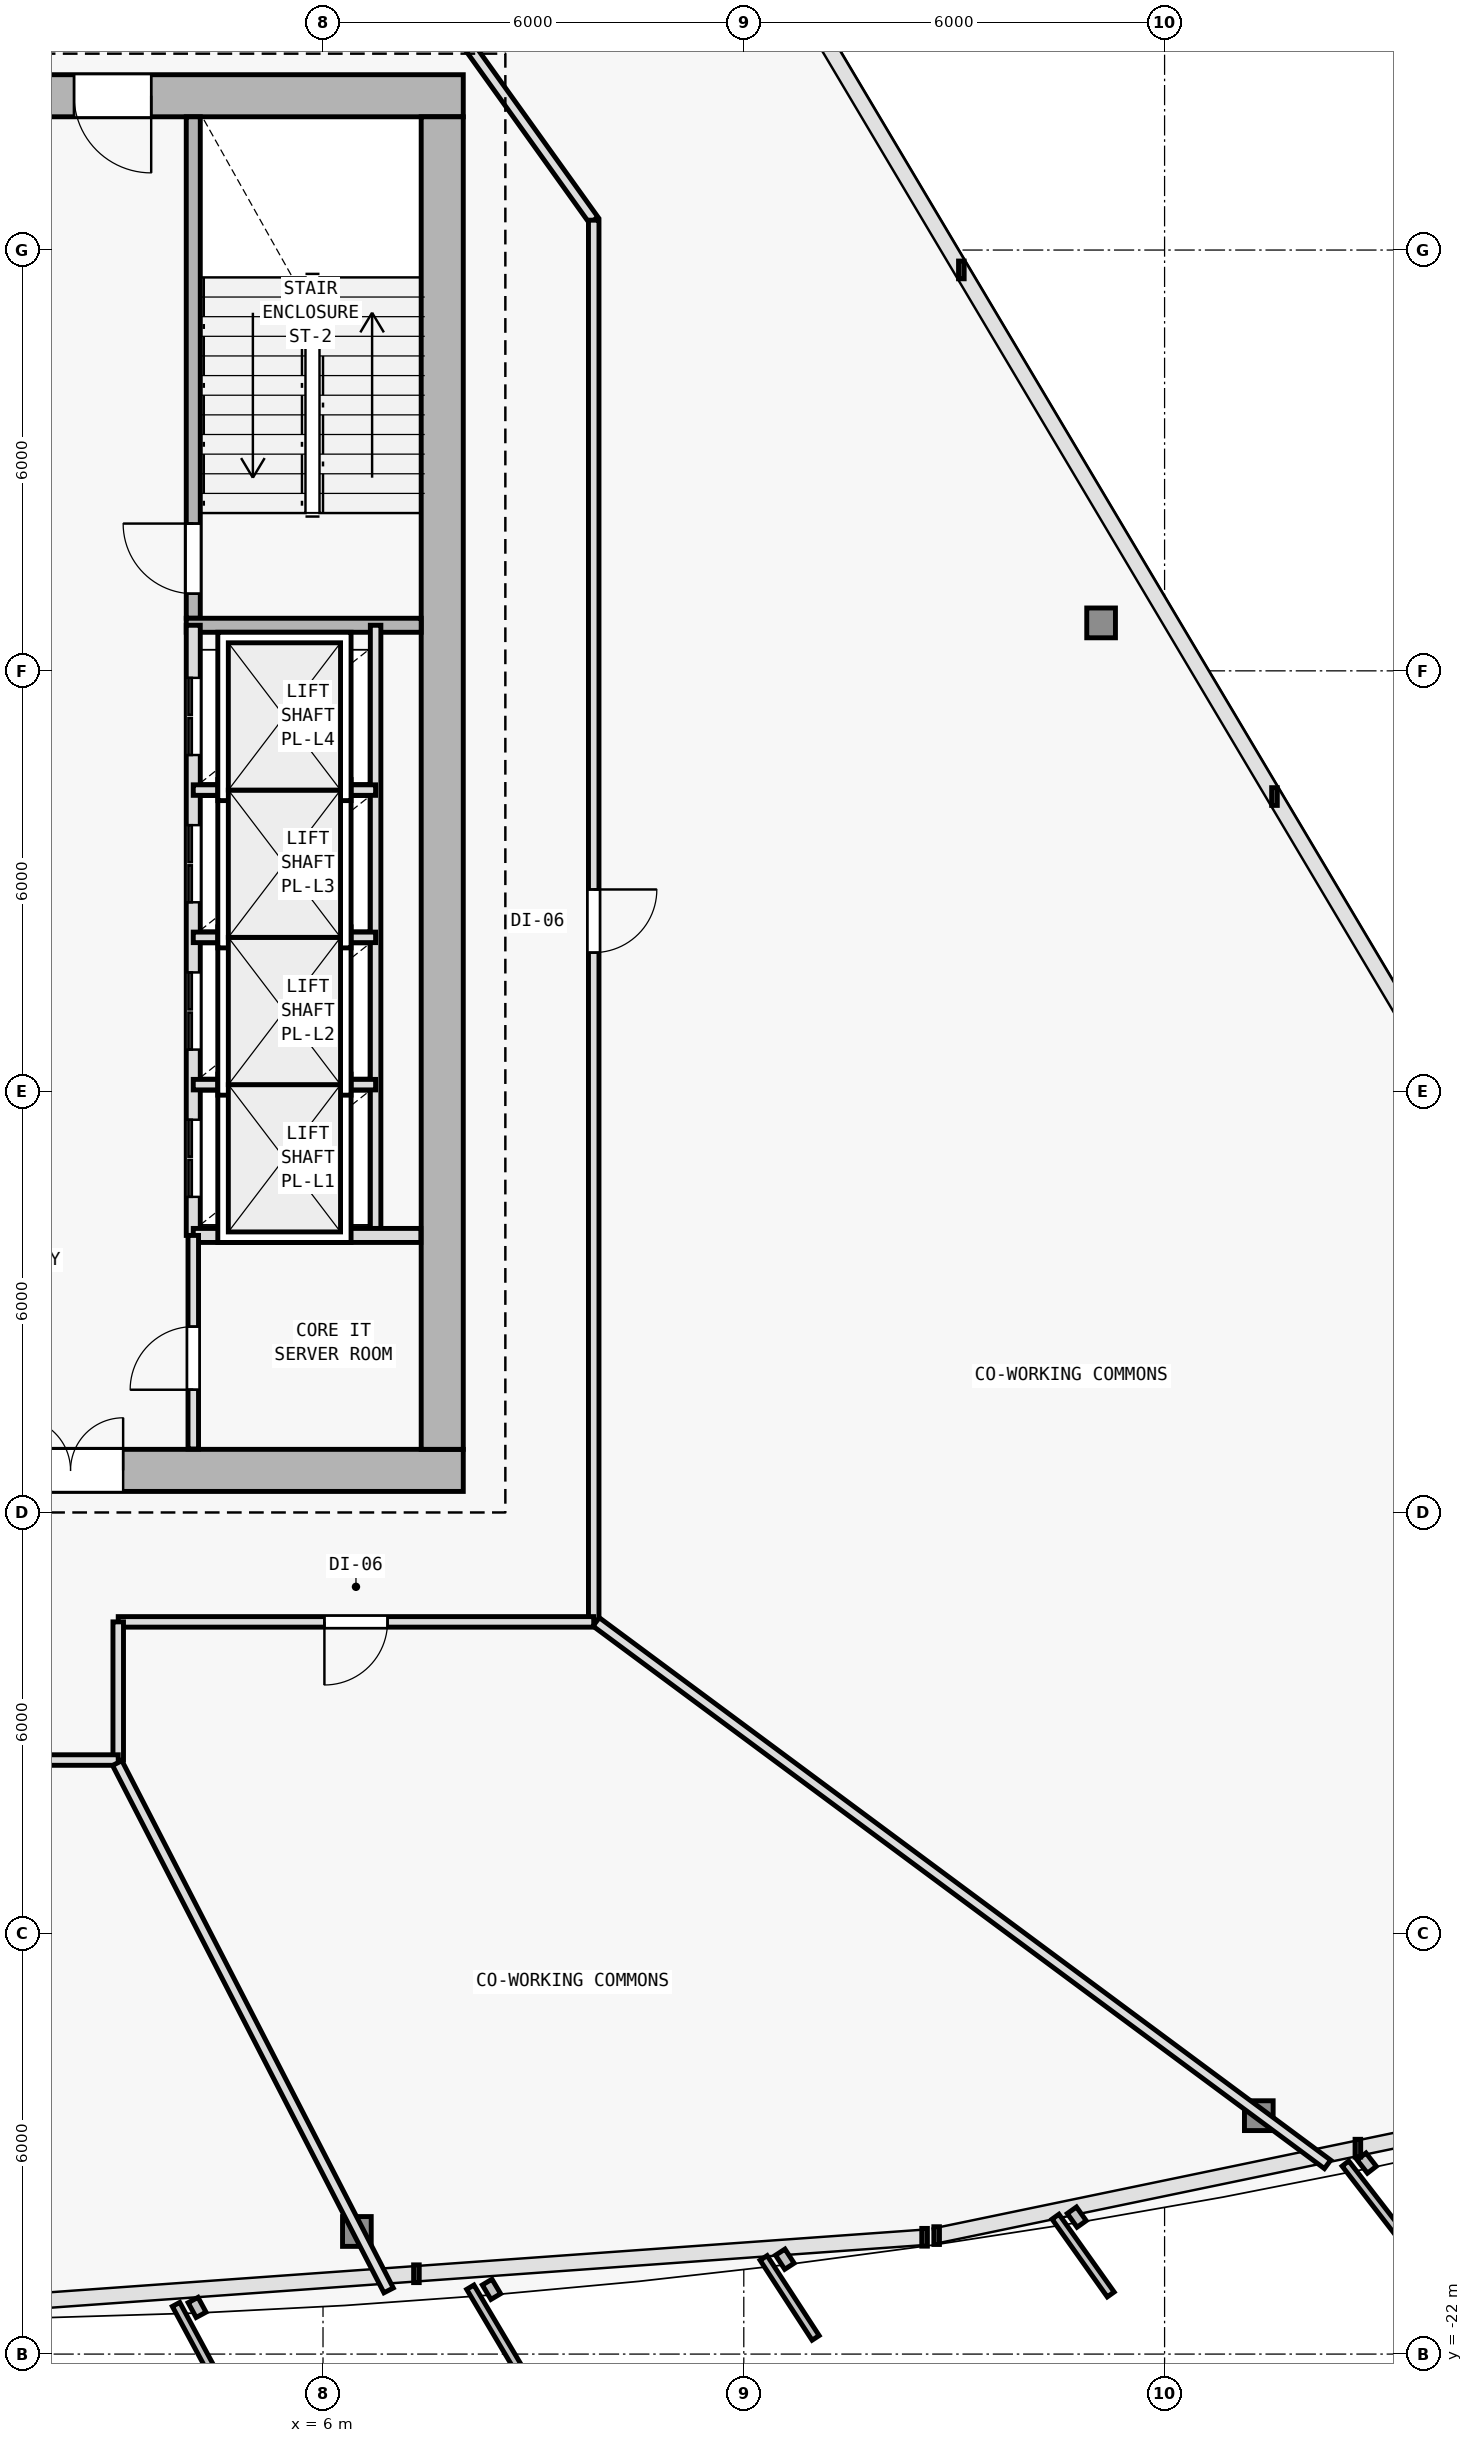
"""IFC4 building model, lengths in metres.
Left out: names, types, materials, properties, quantities, classifications, styles, units other than length and angle.
Written with IfcOpenShell. Run it as: python <this file> out.ifc"""

import sys

from ifc_helpers import new_model, si_unit, direction, frame, frame_2d, origin, origin_2d, place, context, subcontext, project, spatial, rectangle, i_section, extrude, element, fill, save


model = new_model("IFC4")
c1 = context("Model", 3, precision=1e-05, world=origin(), true_north=direction((0.0, 1.0)))
c2 = subcontext(c1, "Body", "Model", "MODEL_VIEW")
j1 = project(units=[si_unit("LENGTHUNIT", "METRE"), si_unit("PLANEANGLEUNIT", "RADIAN")], contexts=[c1])
p1 = place(None, origin())
s1 = spatial("IfcSite", under=j1, at=p1, CompositionType="ELEMENT")
p2 = place(p1, origin())
s2 = spatial("IfcBuilding", under=s1, at=p2, CompositionType="ELEMENT")
p3 = place(p2, frame((0.0, 0.0, 78.0)))
s3 = spatial("IfcBuildingStorey", under=s2, at=p3, CompositionType="ELEMENT", Elevation=78.0)
for number, where, z_axis, x_axis in (
    (1, (7.7, -9.4, 0.0), (0.0, 0.0, 1.0), (1.0, 0.0, 0.0)),
    (2, (7.7, 10.2, 0.0), (0.0, 0.0, 1.0), (1.0, 0.0, 0.0)),
    (3, (7.7, 0.4, 0.0), (0.0, 0.0, 1.0), (1.0, 0.0, 0.0)),
):
    element("IfcColumn", number, at=place(p3, frame(where, z_axis=z_axis, x_axis=x_axis)), inside=s3, PredefinedType="COLUMN", context=c2, shape_type="SweptSolid", body=[
        extrude(i_section(OverallWidth=0.416, OverallDepth=0.446, WebThickness=0.025, FlangeThickness=0.04, FilletRadius=0.015, at=origin_2d()), origin(), (0.0, 0.0, 1.0), 4.5),
    ])
p4 = place(p3, frame((6.483, -20.252, 0.006), z_axis=(-0.005491040061, 0.028216334572, 0.999586758087), x_axis=(-0.981585848295, -0.191021523464, 0.0)))
e4 = element("IfcColumn", 4, at=p4, inside=s3, PredefinedType="COLUMN", context=c2, shape_type="SweptSolid", body=[
    extrude(i_section(OverallWidth=0.409, OverallDepth=0.425, WebThickness=0.021, FlangeThickness=0.034, FilletRadius=0.015, at=origin_2d()), origin(), (0.0, 0.0, 1.0), 4.491),
])
p5 = place(p3, frame((19.344, -18.601, 0.006), z_axis=(-0.016526121628, 0.026800585403, 0.999504185047), x_axis=(-0.851183725565, -0.524867855115, 0.0)))
e5 = element("IfcColumn", 5, at=p5, inside=s3, PredefinedType="COLUMN", context=c2, shape_type="SweptSolid", body=[
    extrude(i_section(OverallWidth=0.409, OverallDepth=0.425, WebThickness=0.021, FlangeThickness=0.034, FilletRadius=0.015, at=origin_2d()), origin(), (0.0, 0.0, 1.0), 4.491),
])
p6 = place(p3, frame((17.095, 2.684, 0.006), z_axis=(-0.015118033886, 0.00761339836, 0.999856730345), x_axis=(-0.449781931574, -0.893138406984, 0.0)))
e6 = element("IfcColumn", 6, at=p6, inside=s3, PredefinedType="COLUMN", context=c2, shape_type="SweptSolid", body=[
    extrude(i_section(OverallWidth=0.409, OverallDepth=0.425, WebThickness=0.021, FlangeThickness=0.034, FilletRadius=0.015, at=origin_2d()), origin(), (0.0, 0.0, 1.0), 4.49),
])
p7 = place(p3, frame((-8.0, -9.4, 0.0), z_axis=(0.0, 0.0, 1.0), x_axis=(1.0, 0.0, 0.0)))
e7 = element("IfcWall", 7, at=p7, inside=s3, PredefinedType="SHEAR", context=c2, shape_type="SweptSolid", body=[
    extrude(rectangle(XDim=16.0, YDim=0.6, at=frame_2d((8.0, 0.0))), origin(), (0.0, 0.0, 1.0), 4.25),
])
p8 = place(p7, frame((9.65, 0.0, 0.0)))
e8 = element("IfcOpeningElement", 8, at=p8, cuts=e7, PredefinedType="OPENING", context=c2, shape_type="SweptSolid", body=[
    extrude(rectangle(XDim=1.5, YDim=2.2, at=frame_2d((0.75, 1.1))), frame((0.0, 0.31, 0.0), z_axis=(0.0, -1.0, 0.0), x_axis=(1.0, 0.0, 0.0)), (0.0, 0.0, 1.0), 0.62),
])
p9 = place(p3, frame((8.0, 10.2, 0.0), z_axis=(0.0, 0.0, 1.0), x_axis=(-1.0, 0.0, 0.0)))
e9 = element("IfcWall", 9, at=p9, inside=s3, PredefinedType="SHEAR", context=c2, shape_type="SweptSolid", body=[
    extrude(rectangle(XDim=16.0, YDim=0.6, at=frame_2d((8.0, 0.0))), origin(), (0.0, 0.0, 1.0), 4.25),
])
p10 = place(p9, frame((4.45, 0.0, 0.0)))
e10 = element("IfcOpeningElement", 10, at=p10, cuts=e9, PredefinedType="OPENING", context=c2, shape_type="SweptSolid", body=[
    extrude(rectangle(XDim=1.1, YDim=2.15, at=frame_2d((0.55, 1.075))), frame((0.0, 0.31, 0.0), z_axis=(0.0, -1.0, 0.0), x_axis=(1.0, 0.0, 0.0)), (0.0, 0.0, 1.0), 0.62),
])
p11 = place(p3, frame((7.7, 9.9, 0.0), z_axis=(0.0, 0.0, 1.0), x_axis=(0.0, -1.0, 0.0)))
e11 = element("IfcWall", 11, at=p11, inside=s3, PredefinedType="SHEAR", context=c2, shape_type="SweptSolid", body=[
    extrude(rectangle(XDim=19.0, YDim=0.6, at=frame_2d((9.5, 0.0))), origin(), (0.0, 0.0, 1.0), 4.25),
])
p12 = place(p3, frame((4.15, 2.75, 0.0), z_axis=(0.0, 0.0, 1.0), x_axis=(0.0, 1.0, 0.0)))
e12 = element("IfcWall", 12, at=p12, inside=s3, PredefinedType="SOLIDWALL", context=c2, shape_type="SweptSolid", body=[
    extrude(rectangle(XDim=7.15, YDim=0.2, at=frame_2d((3.575, 0.0))), origin(), (0.0, 0.0, 1.0), 4.25),
])
p13 = place(p12, frame((0.35, 0.0, 0.0)))
e13 = element("IfcOpeningElement", 13, at=p13, cuts=e12, PredefinedType="OPENING", context=c2, shape_type="SweptSolid", body=[
    extrude(rectangle(XDim=1.0, YDim=2.15, at=frame_2d((0.5, 1.075))), frame((0.0, 0.11, 0.0), z_axis=(0.0, -1.0, 0.0), x_axis=(1.0, 0.0, 0.0)), (0.0, 0.0, 1.0), 0.22),
])
p14 = place(p3, frame((4.05, 2.65, 0.0), z_axis=(0.0, 0.0, 1.0), x_axis=(1.0, 0.0, 0.0)))
e14 = element("IfcWall", 14, at=p14, inside=s3, PredefinedType="SOLIDWALL", context=c2, shape_type="SweptSolid", body=[
    extrude(rectangle(XDim=3.35, YDim=0.2, at=frame_2d((1.675, 0.0))), origin(), (0.0, 0.0, 1.0), 4.25),
])
p15 = place(p3, frame((4.15, -6.05, 0.0), z_axis=(0.0, 0.0, 1.0), x_axis=(0.0, 1.0, 0.0)))
e15 = element("IfcWall", 15, at=p15, inside=s3, PredefinedType="SOLIDWALL", context=c2, shape_type="SweptSolid", body=[
    extrude(rectangle(XDim=8.7, YDim=0.2, at=frame_2d((4.35, 0.0))), origin(), (0.0, 0.0, 1.0), 4.25),
])
p16 = place(p15, frame((0.55, 0.0, 0.0)))
e16 = element("IfcOpeningElement", 16, at=p16, cuts=e15, PredefinedType="OPENING", context=c2, shape_type="SweptSolid", body=[
    extrude(rectangle(XDim=1.1, YDim=2.15, at=frame_2d((0.55, 1.075))), frame((0.0, 0.11, 0.0), z_axis=(0.0, -1.0, 0.0), x_axis=(1.0, 0.0, 0.0)), (0.0, 0.0, 1.0), 0.22),
])
p17 = place(p15, frame((2.65, 0.0, 0.0)))
e17 = element("IfcOpeningElement", 17, at=p17, cuts=e15, PredefinedType="OPENING", context=c2, shape_type="SweptSolid", body=[
    extrude(rectangle(XDim=1.1, YDim=2.15, at=frame_2d((0.55, 1.075))), frame((0.0, 0.11, 0.0), z_axis=(0.0, -1.0, 0.0), x_axis=(1.0, 0.0, 0.0)), (0.0, 0.0, 1.0), 0.22),
])
p18 = place(p15, frame((4.75, 0.0, 0.0)))
e18 = element("IfcOpeningElement", 18, at=p18, cuts=e15, PredefinedType="OPENING", context=c2, shape_type="SweptSolid", body=[
    extrude(rectangle(XDim=1.1, YDim=2.15, at=frame_2d((0.55, 1.075))), frame((0.0, 0.11, 0.0), z_axis=(0.0, -1.0, 0.0), x_axis=(1.0, 0.0, 0.0)), (0.0, 0.0, 1.0), 0.22),
])
p19 = place(p15, frame((6.85, 0.0, 0.0)))
e19 = element("IfcOpeningElement", 19, at=p19, cuts=e15, PredefinedType="OPENING", context=c2, shape_type="SweptSolid", body=[
    extrude(rectangle(XDim=1.1, YDim=2.15, at=frame_2d((0.55, 1.075))), frame((0.0, 0.11, 0.0), z_axis=(0.0, -1.0, 0.0), x_axis=(1.0, 0.0, 0.0)), (0.0, 0.0, 1.0), 0.22),
])
p20 = place(p3, frame((6.75, -6.05, 0.0), z_axis=(0.0, 0.0, 1.0), x_axis=(0.0, 1.0, 0.0)))
e20 = element("IfcWall", 20, at=p20, inside=s3, PredefinedType="PARTITIONING", context=c2, shape_type="SweptSolid", body=[
    extrude(rectangle(XDim=8.7, YDim=0.15, at=frame_2d((4.35, 0.0))), origin(), (0.0, 0.0, 1.0), 4.25),
])
for number, where, z_axis, x_axis in (
    (21, (4.15, -3.9, 0.0), (0.0, 0.0, 1.0), (1.0, 0.0, 0.0)),
    (22, (4.15, -1.8, 0.0), (0.0, 0.0, 1.0), (1.0, 0.0, 0.0)),
    (23, (4.15, 0.3, 0.0), (0.0, 0.0, 1.0), (1.0, 0.0, 0.0)),
):
    element("IfcWall", number, at=place(p3, frame(where, z_axis=z_axis, x_axis=x_axis)), inside=s3, PredefinedType="PARTITIONING", context=c2, shape_type="SweptSolid", body=[
        extrude(rectangle(XDim=2.6, YDim=0.15, at=frame_2d((1.3, 0.0))), origin(), (0.0, 0.0, 1.0), 4.25),
    ])
p21 = place(p3, frame((4.15, -6.05, 0.0), z_axis=(0.0, 0.0, 1.0), x_axis=(1.0, 0.0, 0.0)))
e24 = element("IfcWall", 24, at=p21, inside=s3, PredefinedType="SOLIDWALL", context=c2, shape_type="SweptSolid", body=[
    extrude(rectangle(XDim=3.245, YDim=0.2, at=frame_2d((1.623, 0.0))), origin(), (0.0, 0.0, 1.0), 4.25),
])
p22 = place(p3, frame((4.15, -9.095, 0.0), z_axis=(0.0, 0.0, 1.0), x_axis=(0.0, 1.0, 0.0)))
e25 = element("IfcWall", 25, at=p22, inside=s3, PredefinedType="PARTITIONING", context=c2, shape_type="SweptSolid", body=[
    extrude(rectangle(XDim=3.045, YDim=0.15, at=frame_2d((1.522, 0.0))), origin(), (0.0, 0.0, 1.0), 4.25),
])
p23 = place(p22, frame((0.845, 0.0, 0.0)))
e26 = element("IfcOpeningElement", 26, at=p23, cuts=e25, PredefinedType="OPENING", context=c2, shape_type="SweptSolid", body=[
    extrude(rectangle(XDim=0.9, YDim=2.1, at=frame_2d((0.45, 1.05))), frame((0.0, 0.085, 0.0), z_axis=(0.0, -1.0, 0.0), x_axis=(1.0, 0.0, 0.0)), (0.0, 0.0, 1.0), 0.17),
])
p24 = place(p3, frame((7.041, 12.36, 0.0), z_axis=(0.0, 0.0, 1.0), x_axis=(0.582449511476, -0.812866881218, 0.0)))
e27 = element("IfcWall", 27, at=p24, inside=s3, PredefinedType="PARTITIONING", context=c2, shape_type="SweptSolid", body=[
    extrude(rectangle(XDim=4.84, YDim=0.15, at=frame_2d((2.42, 0.0))), origin(), (0.0, 0.0, 1.0), 3.625),
])
p25 = place(p3, frame((9.86, 8.426, 0.0), z_axis=(0.0, 0.0, 1.0), x_axis=(0.0, -1.0, 0.0)))
e28 = element("IfcWall", 28, at=p25, inside=s3, PredefinedType="PARTITIONING", context=c2, shape_type="SweptSolid", body=[
    extrude(rectangle(XDim=19.986, YDim=0.15, at=frame_2d((9.993, 0.0))), origin(), (0.0, 0.0, 1.0), 3.509),
])
p26 = place(p25, frame((9.543, 0.0, 0.0)))
e29 = element("IfcOpeningElement", 29, at=p26, cuts=e28, PredefinedType="OPENING", context=c2, shape_type="SweptSolid", body=[
    extrude(rectangle(XDim=0.9, YDim=2.1, at=frame_2d((0.45, 1.05))), frame((0.0, 0.085, 0.0), z_axis=(0.0, -1.0, 0.0), x_axis=(1.0, 0.0, 0.0)), (0.0, 0.0, 1.0), 0.17),
])
p27 = place(p3, frame((9.86, -11.56, 0.0), z_axis=(0.0, 0.0, 1.0), x_axis=(-1.0, 0.0, 0.0)))
e30 = element("IfcWall", 30, at=p27, inside=s3, PredefinedType="PARTITIONING", context=c2, shape_type="SweptSolid", body=[
    extrude(rectangle(XDim=6.78, YDim=0.15, at=frame_2d((3.39, 0.0))), origin(), (0.0, 0.0, 1.0), 3.925),
])
p28 = place(p27, frame((2.94, 0.0, 0.0)))
e31 = element("IfcOpeningElement", 31, at=p28, cuts=e30, PredefinedType="OPENING", context=c2, shape_type="SweptSolid", body=[
    extrude(rectangle(XDim=0.9, YDim=2.1, at=frame_2d((0.45, 1.05))), frame((0.0, 0.085, 0.0), z_axis=(0.0, -1.0, 0.0), x_axis=(1.0, 0.0, 0.0)), (0.0, 0.0, 1.0), 0.17),
])
p29 = place(p3, frame((3.08, -11.56, 0.0), z_axis=(0.0, 0.0, 1.0), x_axis=(0.0, -1.0, 0.0)))
e32 = element("IfcWall", 32, at=p29, inside=s3, PredefinedType="PARTITIONING", context=c2, shape_type="SweptSolid", body=[
    extrude(rectangle(XDim=1.97, YDim=0.15, at=frame_2d((0.985, 0.0))), origin(), (0.0, 0.0, 1.0), 3.925),
])
p30 = place(p3, frame((3.08, -13.53, 0.0), z_axis=(0.0, 0.0, 1.0), x_axis=(-1.0, 0.0, 0.0)))
e33 = element("IfcWall", 33, at=p30, inside=s3, PredefinedType="PARTITIONING", context=c2, shape_type="SweptSolid", body=[
    extrude(rectangle(XDim=6.16, YDim=0.15, at=frame_2d((3.08, 0.0))), origin(), (0.0, 0.0, 1.0), 3.625),
])
p31 = place(p3, frame((3.066, -13.573, 0.0), z_axis=(0.0, 0.0, 1.0), x_axis=(0.457623291796, -0.889146176287, 0.0)))
e34 = element("IfcWall", 34, at=p31, inside=s3, PredefinedType="PARTITIONING", context=c2, shape_type="SweptSolid", body=[
    extrude(rectangle(XDim=8.456, YDim=0.15, at=frame_2d((4.228, 0.0))), origin(), (0.0, 0.0, 1.0), 3.625),
])
p32 = place(p3, frame((9.895, -11.56, 0.0), z_axis=(0.0, 0.0, 1.0), x_axis=(0.80320598441, -0.59570139047, 0.0)))
e35 = element("IfcWall", 35, at=p32, inside=s3, PredefinedType="PARTITIONING", context=c2, shape_type="SweptSolid", body=[
    extrude(rectangle(XDim=12.984, YDim=0.15, at=frame_2d((6.492, 0.0))), origin(), (0.0, 0.0, 1.0), 3.625),
])
p33 = place(p8, origin())
e36 = element("IfcDoor", 36, at=p33, inside=s3, OperationType="DOUBLE_DOOR_SINGLE_SWING", PredefinedType="DOOR", context=c2, shape_type="SweptSolid", body=[
    extrude(rectangle(XDim=1.5, YDim=2.2, at=frame_2d((0.75, 1.1))), frame((0.0, 0.025, 0.0), z_axis=(0.0, -1.0, 0.0), x_axis=(1.0, 0.0, 0.0)), (0.0, 0.0, 1.0), 0.05),
])
fill(e8, e36)
p34 = place(p10, origin())
e37 = element("IfcDoor", 37, at=p34, inside=s3, OperationType="SINGLE_SWING_LEFT", PredefinedType="DOOR", context=c2, shape_type="SweptSolid", body=[
    extrude(rectangle(XDim=1.1, YDim=2.15, at=frame_2d((0.55, 1.075))), frame((0.0, 0.025, 0.0), z_axis=(0.0, -1.0, 0.0), x_axis=(1.0, 0.0, 0.0)), (0.0, 0.0, 1.0), 0.05),
])
fill(e10, e37)
p35 = place(p13, origin())
e38 = element("IfcDoor", 38, at=p35, inside=s3, OperationType="SINGLE_SWING_RIGHT", PredefinedType="DOOR", context=c2, shape_type="SweptSolid", body=[
    extrude(rectangle(XDim=1.0, YDim=2.15, at=frame_2d((0.5, 1.075))), frame((0.0, 0.025, 0.0), z_axis=(0.0, -1.0, 0.0), x_axis=(1.0, 0.0, 0.0)), (0.0, 0.0, 1.0), 0.05),
])
fill(e13, e38)
p36 = place(p16, origin())
e39 = element("IfcDoor", 39, at=p36, inside=s3, OperationType="DOUBLE_DOOR_SLIDING", PredefinedType="DOOR", context=c2, shape_type="SweptSolid", body=[
    extrude(rectangle(XDim=1.1, YDim=2.15, at=frame_2d((0.55, 1.075))), frame((0.0, 0.025, 0.0), z_axis=(0.0, -1.0, 0.0), x_axis=(1.0, 0.0, 0.0)), (0.0, 0.0, 1.0), 0.05),
])
fill(e16, e39)
p37 = place(p17, origin())
e40 = element("IfcDoor", 40, at=p37, inside=s3, OperationType="DOUBLE_DOOR_SLIDING", PredefinedType="DOOR", context=c2, shape_type="SweptSolid", body=[
    extrude(rectangle(XDim=1.1, YDim=2.15, at=frame_2d((0.55, 1.075))), frame((0.0, 0.025, 0.0), z_axis=(0.0, -1.0, 0.0), x_axis=(1.0, 0.0, 0.0)), (0.0, 0.0, 1.0), 0.05),
])
fill(e17, e40)
p38 = place(p18, origin())
e41 = element("IfcDoor", 41, at=p38, inside=s3, OperationType="DOUBLE_DOOR_SLIDING", PredefinedType="DOOR", context=c2, shape_type="SweptSolid", body=[
    extrude(rectangle(XDim=1.1, YDim=2.15, at=frame_2d((0.55, 1.075))), frame((0.0, 0.025, 0.0), z_axis=(0.0, -1.0, 0.0), x_axis=(1.0, 0.0, 0.0)), (0.0, 0.0, 1.0), 0.05),
])
fill(e18, e41)
p39 = place(p19, origin())
e42 = element("IfcDoor", 42, at=p39, inside=s3, OperationType="DOUBLE_DOOR_SLIDING", PredefinedType="DOOR", context=c2, shape_type="SweptSolid", body=[
    extrude(rectangle(XDim=1.1, YDim=2.15, at=frame_2d((0.55, 1.075))), frame((0.0, 0.025, 0.0), z_axis=(0.0, -1.0, 0.0), x_axis=(1.0, 0.0, 0.0)), (0.0, 0.0, 1.0), 0.05),
])
fill(e19, e42)
p40 = place(p23, origin())
e43 = element("IfcDoor", 43, at=p40, inside=s3, OperationType="SINGLE_SWING_LEFT", PredefinedType="DOOR", context=c2, shape_type="SweptSolid", body=[
    extrude(rectangle(XDim=0.9, YDim=2.1, at=frame_2d((0.45, 1.05))), frame((0.0, 0.025, 0.0), z_axis=(0.0, -1.0, 0.0), x_axis=(1.0, 0.0, 0.0)), (0.0, 0.0, 1.0), 0.05),
])
fill(e26, e43)
p41 = place(p28, origin())
e44 = element("IfcDoor", 44, at=p41, inside=s3, OperationType="SINGLE_SWING_RIGHT", PredefinedType="DOOR", context=c2, shape_type="SweptSolid", body=[
    extrude(rectangle(XDim=0.9, YDim=2.1, at=frame_2d((0.45, 1.05))), frame((0.0, 0.025, 0.0), z_axis=(0.0, -1.0, 0.0), x_axis=(1.0, 0.0, 0.0)), (0.0, 0.0, 1.0), 0.05),
])
fill(e31, e44)
p42 = place(p26, origin())
e45 = element("IfcDoor", 45, at=p42, inside=s3, OperationType="SINGLE_SWING_LEFT", PredefinedType="DOOR", context=c2, shape_type="SweptSolid", body=[
    extrude(rectangle(XDim=0.9, YDim=2.1, at=frame_2d((0.45, 1.05))), frame((0.0, 0.025, 0.0), z_axis=(0.0, -1.0, 0.0), x_axis=(1.0, 0.0, 0.0)), (0.0, 0.0, 1.0), 0.05),
])
fill(e29, e45)
save(model, sys.argv[1])
